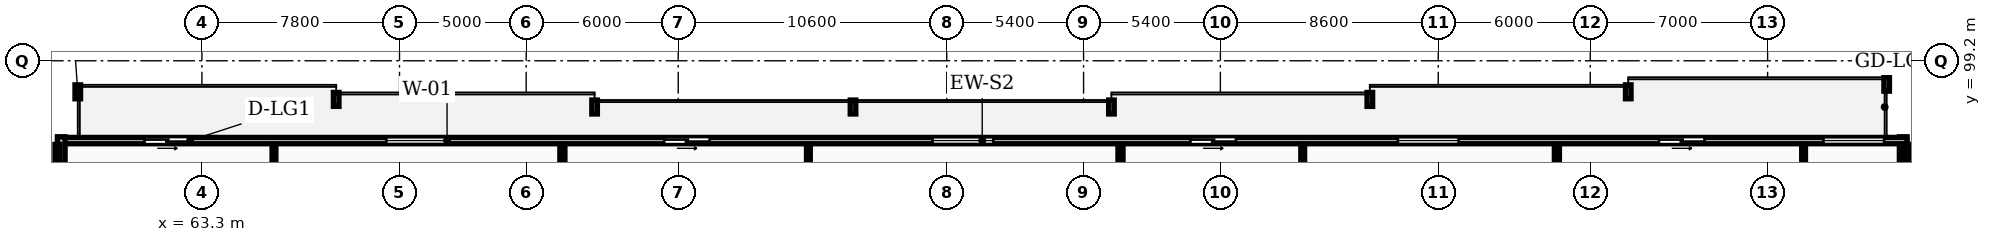
"""IFC4 building model, lengths in metres.
Left out: names, types, materials, properties, quantities, classifications, styles, units other than length and angle.
Written with IfcOpenShell. Run it as: python <this file> out.ifc"""

import sys

from ifc_helpers import new_model, si_unit, direction, frame, frame_2d, origin, place, context, subcontext, project, spatial, rectangle, extrude, element, fill, save


model = new_model("IFC4")
c1 = context("Model", 3, precision=1e-05, world=origin(), true_north=direction((0.0, 1.0)))
c2 = subcontext(c1, "Body", "Model", "MODEL_VIEW")
j1 = project(units=[si_unit("LENGTHUNIT", "METRE"), si_unit("PLANEANGLEUNIT", "RADIAN")], contexts=[c1])
p1 = place(None, origin())
s1 = spatial("IfcSite", under=j1, at=p1, CompositionType="ELEMENT")
p2 = place(p1, origin())
s2 = spatial("IfcBuilding", under=s1, at=p2, CompositionType="ELEMENT")
p3 = place(p2, frame((0.0, 0.0, 93.8)))
s3 = spatial("IfcBuildingStorey", under=s2, at=p3, CompositionType="ELEMENT", Elevation=93.8)
p4 = place(p3, frame((130.45, 92.6, 0.0), z_axis=(0.0, 0.0, 1.0), x_axis=(0.0, 1.0, 0.0)))
e1 = element("IfcWall", 1, at=p4, inside=s3, PredefinedType="STANDARD", context=c2, shape_type="SweptSolid", body=[
    extrude(rectangle(XDim=3.6, YDim=0.3, at=frame_2d((1.8, 0.0))), origin(), (0.0, 0.0, 1.0), 2.97),
])
p5 = place(p3, frame((130.6, 96.05, 0.0), z_axis=(0.0, 0.0, 1.0), x_axis=(-1.0, 0.0, 0.0)))
e2 = element("IfcWall", 2, at=p5, inside=s3, PredefinedType="STANDARD", context=c2, shape_type="SweptSolid", body=[
    extrude(rectangle(XDim=73.0, YDim=0.25, at=frame_2d((36.5, 0.0))), origin(), (0.0, 0.0, 1.0), 2.97),
])
p6 = place(p5, frame((67.768, 0.0, 0.0)))
e3 = element("IfcOpeningElement", 3, at=p6, cuts=e2, PredefinedType="OPENING", context=c2, shape_type="SweptSolid", body=[
    extrude(rectangle(XDim=1.8, YDim=2.2, at=frame_2d((0.9, 1.1))), frame((0.0, 0.135, 0.0), z_axis=(0.0, -1.0, 0.0), x_axis=(1.0, 0.0, 0.0)), (0.0, 0.0, 1.0), 0.27),
])
p7 = place(p5, frame((57.624, 0.0, 0.85)))
e4 = element("IfcOpeningElement", 4, at=p7, cuts=e2, PredefinedType="OPENING", context=c2, shape_type="SweptSolid", body=[
    extrude(rectangle(XDim=2.4, YDim=1.9, at=frame_2d((1.2, 0.95))), frame((0.0, 0.135, 0.0), z_axis=(0.0, -1.0, 0.0), x_axis=(1.0, 0.0, 0.0)), (0.0, 0.0, 1.0), 0.27),
])
p8 = place(p5, frame((47.257, 0.0, 0.0)))
e5 = element("IfcOpeningElement", 5, at=p8, cuts=e2, PredefinedType="OPENING", context=c2, shape_type="SweptSolid", body=[
    extrude(rectangle(XDim=1.8, YDim=2.2, at=frame_2d((0.9, 1.1))), frame((0.0, 0.135, 0.0), z_axis=(0.0, -1.0, 0.0), x_axis=(1.0, 0.0, 0.0)), (0.0, 0.0, 1.0), 0.27),
])
p9 = place(p5, frame((36.062, 0.0, 0.85)))
e6 = element("IfcOpeningElement", 6, at=p9, cuts=e2, PredefinedType="OPENING", context=c2, shape_type="SweptSolid", body=[
    extrude(rectangle(XDim=2.4, YDim=1.9, at=frame_2d((1.2, 0.95))), frame((0.0, 0.135, 0.0), z_axis=(0.0, -1.0, 0.0), x_axis=(1.0, 0.0, 0.0)), (0.0, 0.0, 1.0), 0.27),
])
p10 = place(p5, frame((26.486, 0.0, 0.0)))
e7 = element("IfcOpeningElement", 7, at=p10, cuts=e2, PredefinedType="OPENING", context=c2, shape_type="SweptSolid", body=[
    extrude(rectangle(XDim=1.8, YDim=2.2, at=frame_2d((0.9, 1.1))), frame((0.0, 0.135, 0.0), z_axis=(0.0, -1.0, 0.0), x_axis=(1.0, 0.0, 0.0)), (0.0, 0.0, 1.0), 0.27),
])
p11 = place(p5, frame((17.694, 0.0, 0.85)))
e8 = element("IfcOpeningElement", 8, at=p11, cuts=e2, PredefinedType="OPENING", context=c2, shape_type="SweptSolid", body=[
    extrude(rectangle(XDim=2.4, YDim=1.9, at=frame_2d((1.2, 0.95))), frame((0.0, 0.135, 0.0), z_axis=(0.0, -1.0, 0.0), x_axis=(1.0, 0.0, 0.0)), (0.0, 0.0, 1.0), 0.27),
])
p12 = place(p5, frame((7.989, 0.0, 0.0)))
e9 = element("IfcOpeningElement", 9, at=p12, cuts=e2, PredefinedType="OPENING", context=c2, shape_type="SweptSolid", body=[
    extrude(rectangle(XDim=1.8, YDim=2.2, at=frame_2d((0.9, 1.1))), frame((0.0, 0.135, 0.0), z_axis=(0.0, -1.0, 0.0), x_axis=(1.0, 0.0, 0.0)), (0.0, 0.0, 1.0), 0.27),
])
p13 = place(p5, frame((0.9, 0.0, 0.85)))
e10 = element("IfcOpeningElement", 10, at=p13, cuts=e2, PredefinedType="OPENING", context=c2, shape_type="SweptSolid", body=[
    extrude(rectangle(XDim=2.4, YDim=1.9, at=frame_2d((1.2, 0.95))), frame((0.0, 0.135, 0.0), z_axis=(0.0, -1.0, 0.0), x_axis=(1.0, 0.0, 0.0)), (0.0, 0.0, 1.0), 0.27),
])
p14 = place(p3, frame((57.75, 96.2, 0.0), z_axis=(0.0, 0.0, 1.0), x_axis=(0.0, -1.0, 0.0)))
e11 = element("IfcWall", 11, at=p14, inside=s3, PredefinedType="STANDARD", context=c2, shape_type="SweptSolid", body=[
    extrude(rectangle(XDim=3.6, YDim=0.3, at=frame_2d((1.8, 0.0))), origin(), (0.0, 0.0, 1.0), 2.97),
])
for number, where, z_axis, x_axis in (
    (12, (57.6, 69.83, 0.0), (0.0, 0.0, 1.0), (0.0, 1.0, 0.0)),
    (13, (130.6, 69.83, 0.0), (0.0, 0.0, 1.0), (0.0, 1.0, 0.0)),
    (14, (77.528, 69.83, 0.0), (0.0, 0.0, 1.0), (0.0, 1.0, 0.0)),
):
    element("IfcWall", number, at=place(p3, frame(where, z_axis=z_axis, x_axis=x_axis)), inside=s3, PredefinedType="PARTITIONING", context=c2, shape_type="SweptSolid", body=[
        extrude(rectangle(XDim=26.07, YDim=0.2, at=frame_2d((13.035, 0.0))), origin(), (0.0, 0.0, 1.0), 2.97),
    ])
p15 = place(p3, frame((66.144, 90.73, 0.0), z_axis=(0.0, 0.0, 1.0), x_axis=(0.0, 1.0, 0.0)))
e15 = element("IfcWall", 15, at=p15, inside=s3, PredefinedType="PARTITIONING", context=c2, shape_type="SweptSolid", body=[
    extrude(rectangle(XDim=5.17, YDim=0.15, at=frame_2d((2.585, 0.0))), origin(), (0.0, 0.0, 1.0), 2.97),
])
p16 = place(p3, frame((99.558, 69.83, 0.0), z_axis=(0.0, 0.0, 1.0), x_axis=(0.0, 1.0, 0.0)))
e16 = element("IfcWall", 16, at=p16, inside=s3, PredefinedType="PARTITIONING", context=c2, shape_type="SweptSolid", body=[
    extrude(rectangle(XDim=26.07, YDim=0.2, at=frame_2d((13.035, 0.0))), origin(), (0.0, 0.0, 1.0), 2.97),
])
p17 = place(p3, frame((87.238, 90.73, 0.0), z_axis=(0.0, 0.0, 1.0), x_axis=(0.0, 1.0, 0.0)))
e17 = element("IfcWall", 17, at=p17, inside=s3, PredefinedType="PARTITIONING", context=c2, shape_type="SweptSolid", body=[
    extrude(rectangle(XDim=5.17, YDim=0.15, at=frame_2d((2.585, 0.0))), origin(), (0.0, 0.0, 1.0), 2.97),
])
p18 = place(p3, frame((116.783, 69.83, 0.0), z_axis=(0.0, 0.0, 1.0), x_axis=(0.0, 1.0, 0.0)))
e18 = element("IfcWall", 18, at=p18, inside=s3, PredefinedType="PARTITIONING", context=c2, shape_type="SweptSolid", body=[
    extrude(rectangle(XDim=26.07, YDim=0.2, at=frame_2d((13.035, 0.0))), origin(), (0.0, 0.0, 1.0), 2.97),
])
p19 = place(p3, frame((106.75, 90.73, 0.0), z_axis=(0.0, 0.0, 1.0), x_axis=(0.0, 1.0, 0.0)))
e19 = element("IfcWall", 19, at=p19, inside=s3, PredefinedType="PARTITIONING", context=c2, shape_type="SweptSolid", body=[
    extrude(rectangle(XDim=5.17, YDim=0.15, at=frame_2d((2.585, 0.0))), origin(), (0.0, 0.0, 1.0), 2.97),
])
p20 = place(p3, frame((126.52, 85.59, 0.0), z_axis=(0.0, 0.0, 1.0), x_axis=(0.0, 1.0, 0.0)))
e20 = element("IfcWall", 20, at=p20, inside=s3, PredefinedType="PARTITIONING", context=c2, shape_type="SweptSolid", body=[
    extrude(rectangle(XDim=10.31, YDim=0.15, at=frame_2d((5.155, 0.0))), origin(), (0.0, 0.0, 1.0), 2.97),
])
p21 = place(p20, frame((1.43, 0.0, 0.0)))
e21 = element("IfcOpeningElement", 21, at=p21, cuts=e20, PredefinedType="OPENING", context=c2, shape_type="SweptSolid", body=[
    extrude(rectangle(XDim=0.84, YDim=2.04, at=frame_2d((0.42, 1.02))), frame((0.0, 0.085, 0.0), z_axis=(0.0, -1.0, 0.0), x_axis=(1.0, 0.0, 0.0)), (0.0, 0.0, 1.0), 0.17),
])
p22 = place(p20, frame((3.102, 0.0, 0.0)))
e22 = element("IfcOpeningElement", 22, at=p22, cuts=e20, PredefinedType="OPENING", context=c2, shape_type="SweptSolid", body=[
    extrude(rectangle(XDim=0.84, YDim=2.04, at=frame_2d((0.42, 1.02))), frame((0.0, 0.085, 0.0), z_axis=(0.0, -1.0, 0.0), x_axis=(1.0, 0.0, 0.0)), (0.0, 0.0, 1.0), 0.17),
])
p23 = place(p20, frame((7.29, 0.0, 0.0)))
e23 = element("IfcOpeningElement", 23, at=p23, cuts=e20, PredefinedType="OPENING", context=c2, shape_type="SweptSolid", body=[
    extrude(rectangle(XDim=0.88, YDim=2.06, at=frame_2d((0.44, 1.03))), frame((0.0, 0.085, 0.0), z_axis=(0.0, -1.0, 0.0), x_axis=(1.0, 0.0, 0.0)), (0.0, 0.0, 1.0), 0.17),
])
p24 = place(p6, origin())
e24 = element("IfcDoor", 24, at=p24, inside=s3, OperationType="SLIDING_TO_LEFT", PredefinedType="DOOR", context=c2, shape_type="SweptSolid", body=[
    extrude(rectangle(XDim=1.8, YDim=2.2, at=frame_2d((0.9, 1.1))), frame((0.0, 0.025, 0.0), z_axis=(0.0, -1.0, 0.0), x_axis=(1.0, 0.0, 0.0)), (0.0, 0.0, 1.0), 0.05),
])
fill(e3, e24)
p25 = place(p7, origin())
e25 = element("IfcWindow", 25, at=p25, inside=s3, PartitioningType="DOUBLE_PANEL_VERTICAL", PredefinedType="WINDOW", context=c2, shape_type="SweptSolid", body=[
    extrude(rectangle(XDim=2.4, YDim=1.9, at=frame_2d((1.2, 0.95))), frame((0.0, 0.03, 0.0), z_axis=(0.0, -1.0, 0.0), x_axis=(1.0, 0.0, 0.0)), (0.0, 0.0, 1.0), 0.06),
])
fill(e4, e25)
p26 = place(p8, origin())
e26 = element("IfcDoor", 26, at=p26, inside=s3, OperationType="SLIDING_TO_LEFT", PredefinedType="DOOR", context=c2, shape_type="SweptSolid", body=[
    extrude(rectangle(XDim=1.8, YDim=2.2, at=frame_2d((0.9, 1.1))), frame((0.0, 0.025, 0.0), z_axis=(0.0, -1.0, 0.0), x_axis=(1.0, 0.0, 0.0)), (0.0, 0.0, 1.0), 0.05),
])
fill(e5, e26)
p27 = place(p9, origin())
e27 = element("IfcWindow", 27, at=p27, inside=s3, PartitioningType="DOUBLE_PANEL_VERTICAL", PredefinedType="WINDOW", context=c2, shape_type="SweptSolid", body=[
    extrude(rectangle(XDim=2.4, YDim=1.9, at=frame_2d((1.2, 0.95))), frame((0.0, 0.03, 0.0), z_axis=(0.0, -1.0, 0.0), x_axis=(1.0, 0.0, 0.0)), (0.0, 0.0, 1.0), 0.06),
])
fill(e6, e27)
p28 = place(p10, origin())
e28 = element("IfcDoor", 28, at=p28, inside=s3, OperationType="SLIDING_TO_LEFT", PredefinedType="DOOR", context=c2, shape_type="SweptSolid", body=[
    extrude(rectangle(XDim=1.8, YDim=2.2, at=frame_2d((0.9, 1.1))), frame((0.0, 0.025, 0.0), z_axis=(0.0, -1.0, 0.0), x_axis=(1.0, 0.0, 0.0)), (0.0, 0.0, 1.0), 0.05),
])
fill(e7, e28)
p29 = place(p11, origin())
e29 = element("IfcWindow", 29, at=p29, inside=s3, PartitioningType="DOUBLE_PANEL_VERTICAL", PredefinedType="WINDOW", context=c2, shape_type="SweptSolid", body=[
    extrude(rectangle(XDim=2.4, YDim=1.9, at=frame_2d((1.2, 0.95))), frame((0.0, 0.03, 0.0), z_axis=(0.0, -1.0, 0.0), x_axis=(1.0, 0.0, 0.0)), (0.0, 0.0, 1.0), 0.06),
])
fill(e8, e29)
p30 = place(p12, origin())
e30 = element("IfcDoor", 30, at=p30, inside=s3, OperationType="SLIDING_TO_LEFT", PredefinedType="DOOR", context=c2, shape_type="SweptSolid", body=[
    extrude(rectangle(XDim=1.8, YDim=2.2, at=frame_2d((0.9, 1.1))), frame((0.0, 0.025, 0.0), z_axis=(0.0, -1.0, 0.0), x_axis=(1.0, 0.0, 0.0)), (0.0, 0.0, 1.0), 0.05),
])
fill(e9, e30)
p31 = place(p13, origin())
e31 = element("IfcWindow", 31, at=p31, inside=s3, PartitioningType="DOUBLE_PANEL_VERTICAL", PredefinedType="WINDOW", context=c2, shape_type="SweptSolid", body=[
    extrude(rectangle(XDim=2.4, YDim=1.9, at=frame_2d((1.2, 0.95))), frame((0.0, 0.03, 0.0), z_axis=(0.0, -1.0, 0.0), x_axis=(1.0, 0.0, 0.0)), (0.0, 0.0, 1.0), 0.06),
])
fill(e10, e31)
save(model, sys.argv[1])
